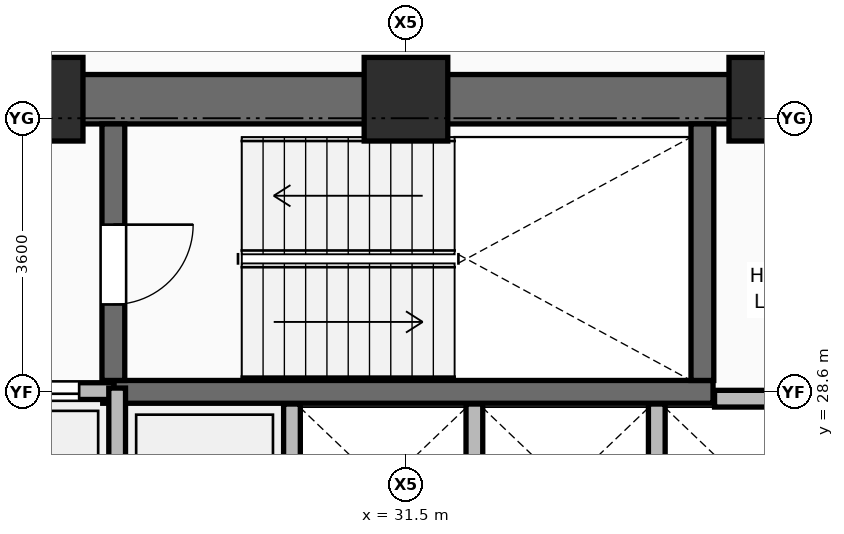
"""IFC4 building model, lengths in metres.
Left out: names, types, materials, properties, quantities, classifications, styles, units other than length and angle.
Written with IfcOpenShell. Run it as: python <this file> out.ifc"""

import sys

from ifc_helpers import new_model, si_unit, direction, frame, frame_2d, origin, origin_2d, place, context, subcontext, project, spatial, rectangle, extrude, element, fill, save


model = new_model("IFC4")
c1 = context("Model", 3, precision=1e-05, world=origin(), true_north=direction((0.0, 1.0)))
c2 = subcontext(c1, "Body", "Model", "MODEL_VIEW")
j1 = project(units=[si_unit("LENGTHUNIT", "METRE"), si_unit("PLANEANGLEUNIT", "RADIAN")], contexts=[c1])
p1 = place(None, origin())
s1 = spatial("IfcSite", under=j1, at=p1, CompositionType="ELEMENT")
p2 = place(p1, origin())
s2 = spatial("IfcBuilding", under=s1, at=p2, CompositionType="ELEMENT")
p3 = place(p2, frame((0.0, 0.0, 83.25)))
s3 = spatial("IfcBuildingStorey", under=s2, at=p3, CompositionType="ELEMENT", Elevation=83.25)
for number, where, z_axis, x_axis in (
    (1, (26.7, 32.45, 0.0), (0.0, 0.0, 1.0), (1.0, 0.0, 0.0)),
    (2, (31.5, 32.45, 0.0), (0.0, 0.0, 1.0), (1.0, 0.0, 0.0)),
    (3, (36.3, 32.45, 0.0), (0.0, 0.0, 1.0), (1.0, 0.0, 0.0)),
):
    element("IfcColumn", number, at=place(p3, frame(where, z_axis=z_axis, x_axis=x_axis)), inside=s3, PredefinedType="COLUMN", context=c2, shape_type="SweptSolid", body=[
        extrude(rectangle(XDim=1.1, YDim=1.1, at=origin_2d()), origin(), (0.0, 0.0, 1.0), 3.75),
    ])
p4 = place(p3, frame((30.0, 25.71, 0.0), z_axis=(0.0, 0.0, 1.0), x_axis=(0.0, 1.0, 0.0)))
e4 = element("IfcWall", 4, at=p4, inside=s3, PredefinedType="PARTITIONING", context=c2, shape_type="SweptSolid", body=[
    extrude(rectangle(XDim=2.73, YDim=0.22, at=frame_2d((1.365, 0.0))), origin(), (0.0, 0.0, 1.0), 3.545),
])
p5 = place(p3, frame((32.4, 26.2, 0.0), z_axis=(0.0, 0.0, 1.0), x_axis=(0.0, 1.0, 0.0)))
e5 = element("IfcWall", 5, at=p5, inside=s3, PredefinedType="PARTITIONING", context=c2, shape_type="SweptSolid", body=[
    extrude(rectangle(XDim=2.24, YDim=0.22, at=frame_2d((1.12, 0.0))), origin(), (0.0, 0.0, 1.0), 3.545),
])
p6 = place(p3, frame((34.8, 26.23, 0.0), z_axis=(0.0, 0.0, 1.0), x_axis=(0.0, 1.0, 0.0)))
e6 = element("IfcWall", 6, at=p6, inside=s3, PredefinedType="PARTITIONING", context=c2, shape_type="SweptSolid", body=[
    extrude(rectangle(XDim=2.21, YDim=0.22, at=frame_2d((1.105, 0.0))), origin(), (0.0, 0.0, 1.0), 3.545),
])
p7 = place(p3, frame((21.575, 32.45, 0.0), z_axis=(0.0, 0.0, 1.0), x_axis=(1.0, 0.0, 0.0)))
e7 = element("IfcWall", 7, at=p7, inside=s3, PredefinedType="SHEAR", context=c2, shape_type="SweptSolid", body=[
    extrude(rectangle(XDim=19.85, YDim=0.65, at=frame_2d((9.925, 0.0))), origin(), (0.0, 0.0, 1.0), 3.57),
])
p8 = place(p7, frame((2.175, 0.0, 0.0)))
e8 = element("IfcOpeningElement", 8, at=p8, cuts=e7, PredefinedType="OPENING", context=c2, shape_type="SweptSolid", body=[
    extrude(rectangle(XDim=1.1, YDim=2.1, at=frame_2d((0.55, 1.05))), frame((0.0, 0.335, 0.0), z_axis=(0.0, -1.0, 0.0), x_axis=(1.0, 0.0, 0.0)), (0.0, 0.0, 1.0), 0.67),
])
p9 = place(p7, frame((15.565, 0.0, 0.0)))
e9 = element("IfcOpeningElement", 9, at=p9, cuts=e7, PredefinedType="OPENING", context=c2, shape_type="SweptSolid", body=[
    extrude(rectangle(XDim=1.0, YDim=2.1, at=frame_2d((0.5, 1.05))), frame((0.0, 0.335, 0.0), z_axis=(0.0, -1.0, 0.0), x_axis=(1.0, 0.0, 0.0)), (0.0, 0.0, 1.0), 0.67),
])
p10 = place(p7, frame((17.575, 0.0, 0.0)))
e10 = element("IfcOpeningElement", 10, at=p10, cuts=e7, PredefinedType="OPENING", context=c2, shape_type="SweptSolid", body=[
    extrude(rectangle(XDim=0.9, YDim=2.1, at=frame_2d((0.45, 1.05))), frame((0.0, 0.335, 0.0), z_axis=(0.0, -1.0, 0.0), x_axis=(1.0, 0.0, 0.0)), (0.0, 0.0, 1.0), 0.67),
])
p11 = place(p3, frame((27.51, 28.6, 0.0), z_axis=(0.0, 0.0, 1.0), x_axis=(1.0, 0.0, 0.0)))
e11 = element("IfcWall", 11, at=p11, inside=s3, PredefinedType="SHEAR", context=c2, shape_type="SweptSolid", body=[
    extrude(rectangle(XDim=8.03, YDim=0.3, at=frame_2d((4.015, 0.0))), origin(), (0.0, 0.0, 1.0), 3.57),
])
p12 = place(p3, frame((27.65, 28.75, 0.0), z_axis=(0.0, 0.0, 1.0), x_axis=(0.0, 1.0, 0.0)))
e12 = element("IfcWall", 12, at=p12, inside=s3, PredefinedType="SHEAR", context=c2, shape_type="SweptSolid", body=[
    extrude(rectangle(XDim=3.375, YDim=0.3, at=frame_2d((1.688, 0.0))), origin(), (0.0, 0.0, 1.0), 3.57),
])
p13 = place(p12, frame((1.0, 0.0, 0.0)))
e13 = element("IfcOpeningElement", 13, at=p13, cuts=e12, PredefinedType="OPENING", context=c2, shape_type="SweptSolid", body=[
    extrude(rectangle(XDim=1.05, YDim=2.1, at=frame_2d((0.525, 1.05))), frame((0.0, 0.16, 0.0), z_axis=(0.0, -1.0, 0.0), x_axis=(1.0, 0.0, 0.0)), (0.0, 0.0, 1.0), 0.32),
])
p14 = place(p3, frame((35.4, 28.75, 0.0), z_axis=(0.0, 0.0, 1.0), x_axis=(0.0, 1.0, 0.0)))
e14 = element("IfcWall", 14, at=p14, inside=s3, PredefinedType="SHEAR", context=c2, shape_type="SweptSolid", body=[
    extrude(rectangle(XDim=3.375, YDim=0.3, at=frame_2d((1.688, 0.0))), origin(), (0.0, 0.0, 1.0), 3.57),
])
p15 = place(p3, frame((25.64, 28.61, 0.0), z_axis=(0.0, 0.0, 1.0), x_axis=(1.0, 0.0, 0.0)))
e15 = element("IfcWall", 15, at=p15, inside=s3, PredefinedType="PARTITIONING", context=c2, shape_type="SweptSolid", body=[
    extrude(rectangle(XDim=2.02, YDim=0.22, at=frame_2d((1.01, 0.0))), origin(), (0.0, 0.0, 1.0), 3.55),
])
p16 = place(p15, frame((0.46, 0.0, 0.0)))
e16 = element("IfcOpeningElement", 16, at=p16, cuts=e15, PredefinedType="OPENING", context=c2, shape_type="SweptSolid", body=[
    extrude(rectangle(XDim=1.1, YDim=2.2, at=frame_2d((0.55, 1.1))), frame((0.0, 0.12, 0.0), z_axis=(0.0, -1.0, 0.0), x_axis=(1.0, 0.0, 0.0)), (0.0, 0.0, 1.0), 0.24),
])
p17 = place(p3, frame((35.56, 28.51, 0.0), z_axis=(0.0, 0.0, 1.0), x_axis=(1.0, 0.0, 0.0)))
e17 = element("IfcWall", 17, at=p17, inside=s3, PredefinedType="PARTITIONING", context=c2, shape_type="SweptSolid", body=[
    extrude(rectangle(XDim=1.6, YDim=0.22, at=frame_2d((0.8, 0.0))), origin(), (0.0, 0.0, 1.0), 3.55),
])
p18 = place(p3, frame((27.7, 25.65, 0.0), z_axis=(0.0, 0.0, 1.0), x_axis=(0.0, 1.0, 0.0)))
e18 = element("IfcWall", 18, at=p18, inside=s3, PredefinedType="PARTITIONING", context=c2, shape_type="SweptSolid", body=[
    extrude(rectangle(XDim=3.0, YDim=0.22, at=frame_2d((1.5, 0.0))), origin(), (0.0, 0.0, 1.0), 3.55),
])
p19 = place(p13, frame((1.05, 0.0, 0.0), z_axis=(0.0, 0.0, 1.0), x_axis=(-1.0, 0.0, 0.0)))
e19 = element("IfcDoor", 19, at=p19, inside=s3, OperationType="SINGLE_SWING_LEFT", PredefinedType="DOOR", context=c2, shape_type="SweptSolid", body=[
    extrude(rectangle(XDim=1.05, YDim=2.1, at=frame_2d((0.525, 1.05))), frame((0.0, 0.025, 0.0), z_axis=(0.0, -1.0, 0.0), x_axis=(1.0, 0.0, 0.0)), (0.0, 0.0, 1.0), 0.05),
])
fill(e13, e19)
p20 = place(p16, origin())
e20 = element("IfcDoor", 20, at=p20, inside=s3, OperationType="DOUBLE_DOOR_SLIDING", PredefinedType="DOOR", context=c2, shape_type="SweptSolid", body=[
    extrude(rectangle(XDim=1.1, YDim=2.2, at=frame_2d((0.55, 1.1))), frame((0.0, 0.025, 0.0), z_axis=(0.0, -1.0, 0.0), x_axis=(1.0, 0.0, 0.0)), (0.0, 0.0, 1.0), 0.05),
])
fill(e16, e20)
save(model, sys.argv[1])
